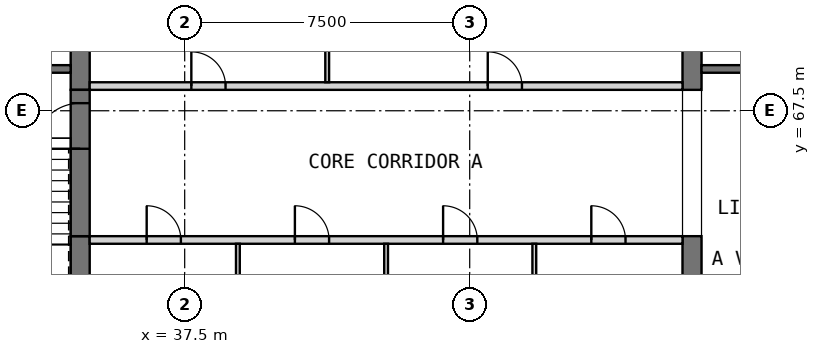
"""IFC4 building model, lengths in metres.
Left out: names, types, materials, properties, quantities, classifications, styles, units other than length and angle.
Written with IfcOpenShell. Run it as: python <this file> out.ifc"""

import sys

from ifc_helpers import new_model, si_unit, direction, frame, frame_2d, origin, place, context, subcontext, project, spatial, rectangle, extrude, element, fill, save


model = new_model("IFC4")
c1 = context("Model", 3, precision=1e-05, world=origin(), true_north=direction((0.0, 1.0)))
c2 = subcontext(c1, "Body", "Model", "MODEL_VIEW")
j1 = project(units=[si_unit("LENGTHUNIT", "METRE"), si_unit("PLANEANGLEUNIT", "RADIAN")], contexts=[c1])
p1 = place(None, origin())
s1 = spatial("IfcSite", under=j1, at=p1, CompositionType="ELEMENT")
p2 = place(p1, origin())
s2 = spatial("IfcBuilding", under=s1, at=p2, CompositionType="ELEMENT")
p3 = place(p2, frame((0.0, 0.0, 230.2)))
s3 = spatial("IfcBuildingStorey", under=s2, at=p3, CompositionType="ELEMENT", Elevation=230.2)
p4 = place(p3, frame((34.75, 60.6, 0.0), z_axis=(0.0, 0.0, 1.0), x_axis=(0.0, 1.0, 0.0)))
e1 = element("IfcWall", 1, at=p4, inside=s3, PredefinedType="SHEAR", context=c2, shape_type="SweptSolid", body=[
    extrude(rectangle(XDim=3.6, YDim=0.5, at=frame_2d((1.8, 0.0))), origin(), (0.0, 0.0, 1.0), 3.5),
])
p5 = place(p3, frame((34.75, 68.05, 0.0), z_axis=(0.0, 0.0, 1.0), x_axis=(0.0, 1.0, 0.0)))
e2 = element("IfcWall", 2, at=p5, inside=s3, PredefinedType="SHEAR", context=c2, shape_type="SweptSolid", body=[
    extrude(rectangle(XDim=6.4, YDim=0.5, at=frame_2d((3.2, 0.0))), origin(), (0.0, 0.0, 1.0), 3.5),
])
p6 = place(p3, frame((50.85, 60.6, 0.0), z_axis=(0.0, 0.0, 1.0), x_axis=(0.0, 1.0, 0.0)))
e3 = element("IfcWall", 3, at=p6, inside=s3, PredefinedType="SHEAR", context=c2, shape_type="SweptSolid", body=[
    extrude(rectangle(XDim=3.6, YDim=0.5, at=frame_2d((1.8, 0.0))), origin(), (0.0, 0.0, 1.0), 3.5),
])
p7 = place(p3, frame((50.85, 68.05, 0.0), z_axis=(0.0, 0.0, 1.0), x_axis=(0.0, 1.0, 0.0)))
e4 = element("IfcWall", 4, at=p7, inside=s3, PredefinedType="SHEAR", context=c2, shape_type="SweptSolid", body=[
    extrude(rectangle(XDim=6.4, YDim=0.5, at=frame_2d((3.2, 0.0))), origin(), (0.0, 0.0, 1.0), 3.5),
])
p8 = place(p3, frame((35.0, 64.1, 0.0), z_axis=(0.0, 0.0, 1.0), x_axis=(1.0, 0.0, 0.0)))
e5 = element("IfcWall", 5, at=p8, inside=s3, PredefinedType="PARTITIONING", context=c2, shape_type="SweptSolid", body=[
    extrude(rectangle(XDim=15.6, YDim=0.2, at=frame_2d((7.8, 0.0))), origin(), (0.0, 0.0, 1.0), 3.25),
])
p9 = place(p8, frame((1.5, 0.0, 0.0)))
e6 = element("IfcOpeningElement", 6, at=p9, cuts=e5, PredefinedType="OPENING", context=c2, shape_type="SweptSolid", body=[
    extrude(rectangle(XDim=0.9, YDim=2.1, at=frame_2d((0.45, 1.05))), frame((0.0, 0.11, 0.0), z_axis=(0.0, -1.0, 0.0), x_axis=(1.0, 0.0, 0.0)), (0.0, 0.0, 1.0), 0.22),
])
p10 = place(p8, frame((5.4, 0.0, 0.0)))
e7 = element("IfcOpeningElement", 7, at=p10, cuts=e5, PredefinedType="OPENING", context=c2, shape_type="SweptSolid", body=[
    extrude(rectangle(XDim=0.9, YDim=2.1, at=frame_2d((0.45, 1.05))), frame((0.0, 0.11, 0.0), z_axis=(0.0, -1.0, 0.0), x_axis=(1.0, 0.0, 0.0)), (0.0, 0.0, 1.0), 0.22),
])
p11 = place(p8, frame((9.3, 0.0, 0.0)))
e8 = element("IfcOpeningElement", 8, at=p11, cuts=e5, PredefinedType="OPENING", context=c2, shape_type="SweptSolid", body=[
    extrude(rectangle(XDim=0.9, YDim=2.1, at=frame_2d((0.45, 1.05))), frame((0.0, 0.11, 0.0), z_axis=(0.0, -1.0, 0.0), x_axis=(1.0, 0.0, 0.0)), (0.0, 0.0, 1.0), 0.22),
])
p12 = place(p8, frame((13.2, 0.0, 0.0)))
e9 = element("IfcOpeningElement", 9, at=p12, cuts=e5, PredefinedType="OPENING", context=c2, shape_type="SweptSolid", body=[
    extrude(rectangle(XDim=0.9, YDim=2.1, at=frame_2d((0.45, 1.05))), frame((0.0, 0.11, 0.0), z_axis=(0.0, -1.0, 0.0), x_axis=(1.0, 0.0, 0.0)), (0.0, 0.0, 1.0), 0.22),
])
for number, where, z_axis, x_axis in (
    (10, (38.9, 60.6, 0.0), (0.0, 0.0, 1.0), (0.0, 1.0, 0.0)),
    (11, (42.8, 60.6, 0.0), (0.0, 0.0, 1.0), (0.0, 1.0, 0.0)),
    (12, (46.7, 60.6, 0.0), (0.0, 0.0, 1.0), (0.0, 1.0, 0.0)),
):
    element("IfcWall", number, at=place(p3, frame(where, z_axis=z_axis, x_axis=x_axis)), inside=s3, PredefinedType="PARTITIONING", context=c2, shape_type="SweptSolid", body=[
        extrude(rectangle(XDim=3.4, YDim=0.1, at=frame_2d((1.7, 0.0))), origin(), (0.0, 0.0, 1.0), 3.25),
    ])
p13 = place(p3, frame((35.0, 68.15, 0.0), z_axis=(0.0, 0.0, 1.0), x_axis=(1.0, 0.0, 0.0)))
e13 = element("IfcWall", 13, at=p13, inside=s3, PredefinedType="PARTITIONING", context=c2, shape_type="SweptSolid", body=[
    extrude(rectangle(XDim=15.6, YDim=0.2, at=frame_2d((7.8, 0.0))), origin(), (0.0, 0.0, 1.0), 3.25),
])
p14 = place(p13, frame((2.675, 0.0, 0.0)))
e14 = element("IfcOpeningElement", 14, at=p14, cuts=e13, PredefinedType="OPENING", context=c2, shape_type="SweptSolid", body=[
    extrude(rectangle(XDim=0.9, YDim=2.1, at=frame_2d((0.45, 1.05))), frame((0.0, 0.11, 0.0), z_axis=(0.0, -1.0, 0.0), x_axis=(1.0, 0.0, 0.0)), (0.0, 0.0, 1.0), 0.22),
])
p15 = place(p13, frame((10.475, 0.0, 0.0)))
e15 = element("IfcOpeningElement", 15, at=p15, cuts=e13, PredefinedType="OPENING", context=c2, shape_type="SweptSolid", body=[
    extrude(rectangle(XDim=0.9, YDim=2.1, at=frame_2d((0.45, 1.05))), frame((0.0, 0.11, 0.0), z_axis=(0.0, -1.0, 0.0), x_axis=(1.0, 0.0, 0.0)), (0.0, 0.0, 1.0), 0.22),
])
p16 = place(p3, frame((41.25, 68.25, 0.0), z_axis=(0.0, 0.0, 1.0), x_axis=(0.0, 1.0, 0.0)))
e16 = element("IfcWall", 16, at=p16, inside=s3, PredefinedType="PARTITIONING", context=c2, shape_type="SweptSolid", body=[
    extrude(rectangle(XDim=2.75, YDim=0.1, at=frame_2d((1.375, 0.0))), origin(), (0.0, 0.0, 1.0), 3.25),
])
p17 = place(p3, frame((34.75, 64.2, 0.0), z_axis=(0.0, 0.0, 1.0), x_axis=(0.0, 1.0, 0.0)))
e17 = element("IfcWall", 17, at=p17, inside=s3, PredefinedType="SOLIDWALL", context=c2, shape_type="SweptSolid", body=[
    extrude(rectangle(XDim=3.85, YDim=0.5, at=frame_2d((1.925, 0.0))), origin(), (0.0, 0.0, 1.0), 2.3),
])
p18 = place(p17, frame((2.3, 0.0, 0.0)))
e18 = element("IfcOpeningElement", 18, at=p18, cuts=e17, PredefinedType="OPENING", context=c2, shape_type="SweptSolid", body=[
    extrude(rectangle(XDim=1.2, YDim=2.1, at=frame_2d((0.6, 1.05))), frame((0.0, 0.26, 0.0), z_axis=(0.0, -1.0, 0.0), x_axis=(1.0, 0.0, 0.0)), (0.0, 0.0, 1.0), 0.52),
])
p19 = place(p3, frame((30.6, 68.6, 0.0), z_axis=(0.0, 0.0, 1.0), x_axis=(1.0, 0.0, 0.0)))
e19 = element("IfcWall", 19, at=p19, inside=s3, PredefinedType="SOLIDWALL", context=c2, shape_type="SweptSolid", body=[
    extrude(rectangle(XDim=3.9, YDim=0.2, at=frame_2d((1.95, 0.0))), origin(), (0.0, 0.0, 1.0), 3.25),
])
p20 = place(p19, frame((1.7, 0.0, 0.0)))
e20 = element("IfcOpeningElement", 20, at=p20, cuts=e19, PredefinedType="OPENING", context=c2, shape_type="SweptSolid", body=[
    extrude(rectangle(XDim=0.9, YDim=2.1, at=frame_2d((0.45, 1.05))), frame((0.0, 0.11, 0.0), z_axis=(0.0, -1.0, 0.0), x_axis=(1.0, 0.0, 0.0)), (0.0, 0.0, 1.0), 0.22),
])
p21 = place(p3, frame((51.1, 68.6, 0.0), z_axis=(0.0, 0.0, 1.0), x_axis=(1.0, 0.0, 0.0)))
e21 = element("IfcWall", 21, at=p21, inside=s3, PredefinedType="SOLIDWALL", context=c2, shape_type="SweptSolid", body=[
    extrude(rectangle(XDim=8.3, YDim=0.2, at=frame_2d((4.15, 0.0))), origin(), (0.0, 0.0, 1.0), 3.25),
])
p22 = place(p9, origin())
e22 = element("IfcDoor", 22, at=p22, inside=s3, OperationType="SINGLE_SWING_LEFT", PredefinedType="DOOR", context=c2, shape_type="SweptSolid", body=[
    extrude(rectangle(XDim=0.9, YDim=2.1, at=frame_2d((0.45, 1.05))), frame((0.0, 0.025, 0.0), z_axis=(0.0, -1.0, 0.0), x_axis=(1.0, 0.0, 0.0)), (0.0, 0.0, 1.0), 0.05),
])
fill(e6, e22)
p23 = place(p10, origin())
e23 = element("IfcDoor", 23, at=p23, inside=s3, OperationType="SINGLE_SWING_RIGHT", PredefinedType="DOOR", context=c2, shape_type="SweptSolid", body=[
    extrude(rectangle(XDim=0.9, YDim=2.1, at=frame_2d((0.45, 1.05))), frame((0.0, 0.025, 0.0), z_axis=(0.0, -1.0, 0.0), x_axis=(1.0, 0.0, 0.0)), (0.0, 0.0, 1.0), 0.05),
])
fill(e7, e23)
p24 = place(p11, origin())
e24 = element("IfcDoor", 24, at=p24, inside=s3, OperationType="SINGLE_SWING_LEFT", PredefinedType="DOOR", context=c2, shape_type="SweptSolid", body=[
    extrude(rectangle(XDim=0.9, YDim=2.1, at=frame_2d((0.45, 1.05))), frame((0.0, 0.025, 0.0), z_axis=(0.0, -1.0, 0.0), x_axis=(1.0, 0.0, 0.0)), (0.0, 0.0, 1.0), 0.05),
])
fill(e8, e24)
p25 = place(p12, origin())
e25 = element("IfcDoor", 25, at=p25, inside=s3, OperationType="SINGLE_SWING_RIGHT", PredefinedType="DOOR", context=c2, shape_type="SweptSolid", body=[
    extrude(rectangle(XDim=0.9, YDim=2.1, at=frame_2d((0.45, 1.05))), frame((0.0, 0.025, 0.0), z_axis=(0.0, -1.0, 0.0), x_axis=(1.0, 0.0, 0.0)), (0.0, 0.0, 1.0), 0.05),
])
fill(e9, e25)
p26 = place(p14, origin())
e26 = element("IfcDoor", 26, at=p26, inside=s3, OperationType="SINGLE_SWING_LEFT", PredefinedType="DOOR", context=c2, shape_type="SweptSolid", body=[
    extrude(rectangle(XDim=0.9, YDim=2.1, at=frame_2d((0.45, 1.05))), frame((0.0, 0.025, 0.0), z_axis=(0.0, -1.0, 0.0), x_axis=(1.0, 0.0, 0.0)), (0.0, 0.0, 1.0), 0.05),
])
fill(e14, e26)
p27 = place(p15, origin())
e27 = element("IfcDoor", 27, at=p27, inside=s3, OperationType="SINGLE_SWING_RIGHT", PredefinedType="DOOR", context=c2, shape_type="SweptSolid", body=[
    extrude(rectangle(XDim=0.9, YDim=2.1, at=frame_2d((0.45, 1.05))), frame((0.0, 0.025, 0.0), z_axis=(0.0, -1.0, 0.0), x_axis=(1.0, 0.0, 0.0)), (0.0, 0.0, 1.0), 0.05),
])
fill(e15, e27)
p28 = place(p18, origin())
e28 = element("IfcDoor", 28, at=p28, inside=s3, OperationType="SINGLE_SWING_LEFT", PredefinedType="DOOR", context=c2, shape_type="SweptSolid", body=[
    extrude(rectangle(XDim=1.2, YDim=2.1, at=frame_2d((0.6, 1.05))), frame((0.0, 0.025, 0.0), z_axis=(0.0, -1.0, 0.0), x_axis=(1.0, 0.0, 0.0)), (0.0, 0.0, 1.0), 0.05),
])
fill(e18, e28)
save(model, sys.argv[1])
